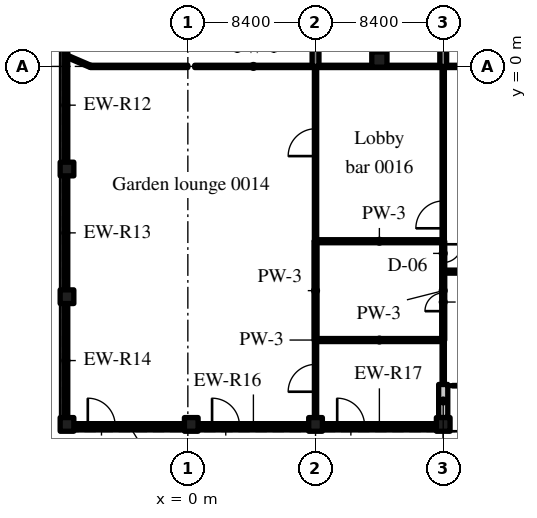
"""IFC4 building model, lengths in metres.
Left out: names, types, materials, properties, quantities, classifications, styles, units other than length and angle.
Written with IfcOpenShell. Run it as: python <this file> out.ifc"""

import sys

from ifc_helpers import new_model, si_unit, direction, frame, frame_2d, origin, origin_2d, place, context, subcontext, project, spatial, rectangle, extrude, source, transform, mapped, element, fill, save


model = new_model("IFC4")
c1 = context("Model", 3, precision=1e-05, world=origin(), true_north=direction((0.0, 1.0)))
c2 = subcontext(c1, "Body", "Model", "MODEL_VIEW")
j1 = project(units=[si_unit("LENGTHUNIT", "METRE"), si_unit("PLANEANGLEUNIT", "RADIAN")], contexts=[c1])
p1 = place(None, origin())
s1 = spatial("IfcSite", under=j1, at=p1, CompositionType="ELEMENT")
p2 = place(p1, origin())
s2 = spatial("IfcBuilding", under=s1, at=p2, CompositionType="ELEMENT")
p3 = place(p2, origin())
s3 = spatial("IfcBuildingStorey", under=s2, at=p3, CompositionType="ELEMENT", Elevation=0.0)
m1 = source(origin(), c2, "Body", "SweptSolid", [
    extrude(rectangle(XDim=19.6, YDim=0.45, at=frame_2d((9.8, 0.0))), origin(), (0.0, 0.0, 1.0), 5.72),
])
for number, where, z_axis, x_axis in (
    (1, (8.4, 0.0, 0.0), (0.0, 0.0, 1.0), (0.0, 1.0, 0.0)),
    (2, (16.8, 0.0, 0.0), (0.0, 0.0, 1.0), (0.0, 1.0, 0.0)),
):
    element("IfcWall", number, at=place(p3, frame(where, z_axis=z_axis, x_axis=x_axis)), inside=s3, PredefinedType="SHEAR", context=c2, shape_type="MappedRepresentation", body=[
        mapped(m1, transform((0.0, 0.0, 0.0), scale=1.0)),
    ])
m2 = source(origin(), c2, "Body", "SweptSolid", [
    extrude(rectangle(XDim=1.0, YDim=1.0, at=origin_2d()), origin(), (0.0, 0.0, 1.0), 5.72),
])
p4 = place(p3, frame((12.6, 0.45, 0.0), z_axis=(0.0, 0.0, 1.0), x_axis=(1.0, 0.0, 0.0)))
e3 = element("IfcColumn", 3, at=p4, inside=s3, PredefinedType="COLUMN", context=c2, shape_type="MappedRepresentation", body=[
    mapped(m2, transform((0.0, 0.0, 0.0), scale=1.0)),
])
m3 = source(origin(), c2, "Body", "SweptSolid", [
    extrude(rectangle(XDim=0.9, YDim=0.9, at=origin_2d()), origin(), (0.0, 0.0, 1.0), 5.72),
])
for number, where, z_axis, x_axis in (
    (4, (-7.95, -23.55, 0.0), (0.0, 0.0, 1.0), (1.0, 0.0, 0.0)),
    (5, (-7.95, -15.15, 0.0), (0.0, 0.0, 1.0), (1.0, 0.0, 0.0)),
    (6, (-7.95, -6.75, 0.0), (0.0, 0.0, 1.0), (1.0, 0.0, 0.0)),
    (7, (0.225, -23.55, 0.0), (0.0, 0.0, 1.0), (1.0, 0.0, 0.0)),
    (8, (8.4, -23.55, 0.0), (0.0, 0.0, 1.0), (1.0, 0.0, 0.0)),
    (9, (16.8, -23.55, 0.0), (0.0, 0.0, 1.0), (1.0, 0.0, 0.0)),
):
    element("IfcColumn", number, at=place(p3, frame(where, z_axis=z_axis, x_axis=x_axis)), inside=s3, PredefinedType="COLUMN", context=c2, shape_type="MappedRepresentation", body=[
        mapped(m3, transform((0.0, 0.0, 0.0), scale=1.0)),
    ])
m4 = source(origin(), c2, "Body", "SweptSolid", [
    extrude(rectangle(XDim=7.5, YDim=0.25, at=frame_2d((3.75, 0.0))), origin(), (0.0, 0.0, 1.0), 4.72),
])
p5 = place(p3, frame((-8.025, 1.2, 0.0), z_axis=(0.0, 0.0, 1.0), x_axis=(0.0, -1.0, 0.0)))
e10 = element("IfcWall", 10, at=p5, inside=s3, PredefinedType="SOLIDWALL", context=c2, shape_type="MappedRepresentation", body=[
    mapped(m4, transform((0.0, 0.0, 0.0), scale=1.0)),
])
m5 = source(origin(), c2, "Body", "SweptSolid", [
    extrude(rectangle(XDim=2.4, YDim=3.0, at=frame_2d((1.2, 1.5))), frame((0.0, 0.135, 0.0), z_axis=(0.0, -1.0, 0.0), x_axis=(1.0, 0.0, 0.0)), (0.0, 0.0, 1.0), 0.27),
])
p6 = place(p5, frame((0.675, 0.0, 0.2)))
e11 = element("IfcOpeningElement", 11, at=p6, cuts=e10, PredefinedType="OPENING", context=c2, shape_type="MappedRepresentation", body=[
    mapped(m5, transform((0.0, 0.0, 0.0), scale=1.0)),
])
p7 = place(p5, frame((4.425, 0.0, 0.2)))
e12 = element("IfcOpeningElement", 12, at=p7, cuts=e10, PredefinedType="OPENING", context=c2, shape_type="MappedRepresentation", body=[
    mapped(m5, transform((0.0, 0.0, 0.0), scale=1.0)),
])
p8 = place(p3, frame((-8.025, -7.2, 0.0), z_axis=(0.0, 0.0, 1.0), x_axis=(0.0, -1.0, 0.0)))
e13 = element("IfcWall", 13, at=p8, inside=s3, PredefinedType="SOLIDWALL", context=c2, shape_type="MappedRepresentation", body=[
    mapped(m4, transform((0.0, 0.0, 0.0), scale=1.0)),
])
p9 = place(p8, frame((0.675, 0.0, 0.2)))
e14 = element("IfcOpeningElement", 14, at=p9, cuts=e13, PredefinedType="OPENING", context=c2, shape_type="MappedRepresentation", body=[
    mapped(m5, transform((0.0, 0.0, 0.0), scale=1.0)),
])
p10 = place(p8, frame((4.425, 0.0, 0.2)))
e15 = element("IfcOpeningElement", 15, at=p10, cuts=e13, PredefinedType="OPENING", context=c2, shape_type="MappedRepresentation", body=[
    mapped(m5, transform((0.0, 0.0, 0.0), scale=1.0)),
])
p11 = place(p3, frame((-8.025, -15.6, 0.0), z_axis=(0.0, 0.0, 1.0), x_axis=(0.0, -1.0, 0.0)))
e16 = element("IfcWall", 16, at=p11, inside=s3, PredefinedType="SOLIDWALL", context=c2, shape_type="MappedRepresentation", body=[
    mapped(m4, transform((0.0, 0.0, 0.0), scale=1.0)),
])
p12 = place(p11, frame((0.675, 0.0, 0.2)))
e17 = element("IfcOpeningElement", 17, at=p12, cuts=e16, PredefinedType="OPENING", context=c2, shape_type="MappedRepresentation", body=[
    mapped(m5, transform((0.0, 0.0, 0.0), scale=1.0)),
])
p13 = place(p11, frame((4.425, 0.0, 0.2)))
e18 = element("IfcOpeningElement", 18, at=p13, cuts=e16, PredefinedType="OPENING", context=c2, shape_type="MappedRepresentation", body=[
    mapped(m5, transform((0.0, 0.0, 0.0), scale=1.0)),
])
m6 = source(origin(), c2, "Body", "SweptSolid", [
    extrude(rectangle(XDim=7.275, YDim=0.25, at=frame_2d((3.637, 0.0))), origin(), (0.0, 0.0, 1.0), 4.65),
])
p14 = place(p3, frame((-7.5, -23.625, 0.0), z_axis=(0.0, 0.0, 1.0), x_axis=(1.0, 0.0, 0.0)))
e19 = element("IfcWall", 19, at=p14, inside=s3, PredefinedType="SOLIDWALL", context=c2, shape_type="MappedRepresentation", body=[
    mapped(m6, transform((0.0, 0.0, 0.0), scale=1.0)),
])
m7 = source(origin(), c2, "Body", "SweptSolid", [
    extrude(rectangle(XDim=1.8, YDim=2.4, at=frame_2d((0.9, 1.2))), frame((0.0, 0.135, 0.0), z_axis=(0.0, -1.0, 0.0), x_axis=(1.0, 0.0, 0.0)), (0.0, 0.0, 1.0), 0.27),
])
p15 = place(p14, frame((0.919, 0.0, 0.0)))
e20 = element("IfcOpeningElement", 20, at=p15, cuts=e19, PredefinedType="OPENING", context=c2, shape_type="MappedRepresentation", body=[
    mapped(m7, transform((0.0, 0.0, 0.0), scale=1.0)),
])
p16 = place(p14, frame((4.256, 0.0, 0.2)))
e21 = element("IfcOpeningElement", 21, at=p16, cuts=e19, PredefinedType="OPENING", context=c2, shape_type="MappedRepresentation", body=[
    mapped(m5, transform((0.0, 0.0, 0.0), scale=1.0)),
])
p17 = place(p3, frame((0.675, -23.625, 0.0), z_axis=(0.0, 0.0, 1.0), x_axis=(1.0, 0.0, 0.0)))
e22 = element("IfcWall", 22, at=p17, inside=s3, PredefinedType="SOLIDWALL", context=c2, shape_type="MappedRepresentation", body=[
    mapped(m6, transform((0.0, 0.0, 0.0), scale=1.0)),
])
p18 = place(p17, frame((0.919, 0.0, 0.0)))
e23 = element("IfcOpeningElement", 23, at=p18, cuts=e22, PredefinedType="OPENING", context=c2, shape_type="MappedRepresentation", body=[
    mapped(m7, transform((0.0, 0.0, 0.0), scale=1.0)),
])
p19 = place(p17, frame((4.256, 0.0, 0.2)))
e24 = element("IfcOpeningElement", 24, at=p19, cuts=e22, PredefinedType="OPENING", context=c2, shape_type="MappedRepresentation", body=[
    mapped(m5, transform((0.0, 0.0, 0.0), scale=1.0)),
])
m8 = source(origin(), c2, "Body", "SweptSolid", [
    extrude(rectangle(XDim=7.5, YDim=0.25, at=frame_2d((3.75, 0.0))), origin(), (0.0, 0.0, 1.0), 4.65),
])
p20 = place(p3, frame((8.85, -23.625, 0.0), z_axis=(0.0, 0.0, 1.0), x_axis=(1.0, 0.0, 0.0)))
e25 = element("IfcWall", 25, at=p20, inside=s3, PredefinedType="SOLIDWALL", context=c2, shape_type="MappedRepresentation", body=[
    mapped(m8, transform((0.0, 0.0, 0.0), scale=1.0)),
])
p21 = place(p20, frame((0.975, 0.0, 0.0)))
e26 = element("IfcOpeningElement", 26, at=p21, cuts=e25, PredefinedType="OPENING", context=c2, shape_type="MappedRepresentation", body=[
    mapped(m7, transform((0.0, 0.0, 0.0), scale=1.0)),
])
p22 = place(p20, frame((4.425, 0.0, 0.2)))
e27 = element("IfcOpeningElement", 27, at=p22, cuts=e25, PredefinedType="OPENING", context=c2, shape_type="MappedRepresentation", body=[
    mapped(m5, transform((0.0, 0.0, 0.0), scale=1.0)),
])
m9 = source(origin(), c2, "Body", "SweptSolid", [
    extrude(rectangle(XDim=2.18, YDim=0.6, at=frame_2d((1.09, 0.0))), origin(), (0.0, 0.0, 1.0), 4.05),
])
p23 = place(p3, frame((16.8, -23.1, 0.0), z_axis=(0.0, 0.0, 1.0), x_axis=(0.0, 1.0, 0.0)))
e28 = element("IfcWall", 28, at=p23, inside=s3, PredefinedType="SOLIDWALL", context=c2, shape_type="MappedRepresentation", body=[
    mapped(m9, transform((0.0, 0.0, 0.0), scale=1.0)),
])
m10 = source(origin(), c2, "Body", "SweptSolid", [
    extrude(rectangle(XDim=7.725, YDim=0.15, at=frame_2d((3.863, 0.0))), origin(), (0.0, 0.0, 1.0), 5.72),
])
p24 = place(p3, frame((0.45, 0.0, 0.0), z_axis=(0.0, 0.0, 1.0), x_axis=(1.0, 0.0, 0.0)))
e29 = element("IfcWall", 29, at=p24, inside=s3, PredefinedType="PARTITIONING", context=c2, shape_type="MappedRepresentation", body=[
    mapped(m10, transform((0.0, 0.0, 0.0), scale=1.0)),
])
m11 = source(origin(), c2, "Body", "SweptSolid", [
    extrude(rectangle(XDim=7.95, YDim=0.15, at=frame_2d((3.975, 0.0))), origin(), (0.0, 0.0, 1.0), 5.72),
])
p25 = place(p3, frame((8.625, 0.0, 0.0), z_axis=(0.0, 0.0, 1.0), x_axis=(1.0, 0.0, 0.0)))
e30 = element("IfcWall", 30, at=p25, inside=s3, PredefinedType="PARTITIONING", context=c2, shape_type="MappedRepresentation", body=[
    mapped(m11, transform((0.0, 0.0, 0.0), scale=1.0)),
])
m12 = source(origin(), c2, "Body", "SweptSolid", [
    extrude(rectangle(XDim=7.95, YDim=0.15, at=frame_2d((3.975, 0.0))), origin(), (0.0, 0.0, 1.0), 5.72),
])
p26 = place(p3, frame((17.025, 0.0, 0.0), z_axis=(0.0, 0.0, 1.0), x_axis=(1.0, 0.0, 0.0)))
e31 = element("IfcWall", 31, at=p26, inside=s3, PredefinedType="PARTITIONING", context=c2, shape_type="MappedRepresentation", body=[
    mapped(m12, transform((0.0, 0.0, 0.0), scale=1.0)),
])
m13 = source(origin(), c2, "Body", "SweptSolid", [
    extrude(rectangle(XDim=5.5, YDim=0.15, at=frame_2d((2.75, 0.0))), origin(), (0.0, 0.0, 1.0), 4.12),
])
p27 = place(p3, frame((8.4, -23.5, 0.0), z_axis=(0.0, 0.0, 1.0), x_axis=(0.0, 1.0, 0.0)))
e32 = element("IfcWall", 32, at=p27, inside=s3, PredefinedType="PARTITIONING", context=c2, shape_type="MappedRepresentation", body=[
    mapped(m13, transform((0.0, 0.0, 0.0), scale=1.0)),
])
m14 = source(origin(), c2, "Body", "SweptSolid", [
    extrude(rectangle(XDim=1.8, YDim=2.1, at=frame_2d((0.9, 1.05))), frame((0.0, 0.085, 0.0), z_axis=(0.0, -1.0, 0.0), x_axis=(1.0, 0.0, 0.0)), (0.0, 0.0, 1.0), 0.17),
])
p28 = place(p27, frame((2.1, 0.0, 0.0)))
e33 = element("IfcOpeningElement", 33, at=p28, cuts=e32, PredefinedType="OPENING", context=c2, shape_type="MappedRepresentation", body=[
    mapped(m14, transform((0.0, 0.0, 0.0), scale=1.0)),
])
m15 = source(origin(), c2, "Body", "SweptSolid", [
    extrude(rectangle(XDim=6.5, YDim=0.2, at=frame_2d((3.25, 0.0))), origin(), (0.0, 0.0, 1.0), 4.12),
])
p29 = place(p3, frame((8.4, -18.0, 0.0), z_axis=(0.0, 0.0, 1.0), x_axis=(0.0, 1.0, 0.0)))
e34 = element("IfcWall", 34, at=p29, inside=s3, PredefinedType="PARTITIONING", context=c2, shape_type="MappedRepresentation", body=[
    mapped(m15, transform((0.0, 0.0, 0.0), scale=1.0)),
])
m16 = source(origin(), c2, "Body", "SweptSolid", [
    extrude(rectangle(XDim=11.425, YDim=0.15, at=frame_2d((5.712, 0.0))), origin(), (0.0, 0.0, 1.0), 4.12),
])
p30 = place(p3, frame((8.4, -11.5, 0.0), z_axis=(0.0, 0.0, 1.0), x_axis=(0.0, 1.0, 0.0)))
e35 = element("IfcWall", 35, at=p30, inside=s3, PredefinedType="PARTITIONING", context=c2, shape_type="MappedRepresentation", body=[
    mapped(m16, transform((0.0, 0.0, 0.0), scale=1.0)),
])
p31 = place(p30, frame((5.6, 0.0, 0.0)))
e36 = element("IfcOpeningElement", 36, at=p31, cuts=e35, PredefinedType="OPENING", context=c2, shape_type="MappedRepresentation", body=[
    mapped(m14, transform((0.0, 0.0, 0.0), scale=1.0)),
])
m17 = source(origin(), c2, "Body", "SweptSolid", [
    extrude(rectangle(XDim=2.92, YDim=0.15, at=frame_2d((1.46, 0.0))), origin(), (0.0, 0.0, 1.0), 4.12),
])
p32 = place(p3, frame((16.8, -20.92, 0.0), z_axis=(0.0, 0.0, 1.0), x_axis=(0.0, 1.0, 0.0)))
e37 = element("IfcWall", 37, at=p32, inside=s3, PredefinedType="PARTITIONING", context=c2, shape_type="MappedRepresentation", body=[
    mapped(m17, transform((0.0, 0.0, 0.0), scale=1.0)),
])
p33 = place(p3, frame((16.8, -18.0, 0.0), z_axis=(0.0, 0.0, 1.0), x_axis=(0.0, 1.0, 0.0)))
e38 = element("IfcWall", 38, at=p33, inside=s3, PredefinedType="PARTITIONING", context=c2, shape_type="MappedRepresentation", body=[
    mapped(m15, transform((0.0, 0.0, 0.0), scale=1.0)),
])
m18 = source(origin(), c2, "Body", "SweptSolid", [
    extrude(rectangle(XDim=1.2, YDim=2.1, at=frame_2d((0.6, 1.05))), frame((0.0, 0.11, 0.0), z_axis=(0.0, -1.0, 0.0), x_axis=(1.0, 0.0, 0.0)), (0.0, 0.0, 1.0), 0.22),
])
p34 = place(p33, frame((1.9, 0.0, 0.0)))
e39 = element("IfcOpeningElement", 39, at=p34, cuts=e38, PredefinedType="OPENING", context=c2, shape_type="MappedRepresentation", body=[
    mapped(m18, transform((0.0, 0.0, 0.0), scale=1.0)),
])
p35 = place(p33, frame((5.1, 0.0, 0.0)))
e40 = element("IfcOpeningElement", 40, at=p35, cuts=e38, PredefinedType="OPENING", context=c2, shape_type="MappedRepresentation", body=[
    mapped(m18, transform((0.0, 0.0, 0.0), scale=1.0)),
])
m19 = source(origin(), c2, "Body", "SweptSolid", [
    extrude(rectangle(XDim=8.4, YDim=0.2, at=frame_2d((4.2, 0.0))), origin(), (0.0, 0.0, 1.0), 5.72),
])
for number, where, z_axis, x_axis in (
    (41, (8.4, -18.0, 0.0), (0.0, 0.0, 1.0), (1.0, 0.0, 0.0)),
    (42, (8.4, -11.5, 0.0), (0.0, 0.0, 1.0), (1.0, 0.0, 0.0)),
):
    element("IfcWall", number, at=place(p3, frame(where, z_axis=z_axis, x_axis=x_axis)), inside=s3, PredefinedType="PARTITIONING", context=c2, shape_type="MappedRepresentation", body=[
        mapped(m19, transform((0.0, 0.0, 0.0), scale=1.0)),
    ])
p36 = place(p3, frame((16.8, -11.5, 0.0), z_axis=(0.0, 0.0, 1.0), x_axis=(0.0, 1.0, 0.0)))
e43 = element("IfcWall", 43, at=p36, inside=s3, PredefinedType="PARTITIONING", context=c2, shape_type="MappedRepresentation", body=[
    mapped(m16, transform((0.0, 0.0, 0.0), scale=1.0)),
])
p37 = place(p36, frame((0.85, 0.0, 0.0)))
e44 = element("IfcOpeningElement", 44, at=p37, cuts=e43, PredefinedType="OPENING", context=c2, shape_type="MappedRepresentation", body=[
    mapped(m14, transform((0.0, 0.0, 0.0), scale=1.0)),
])
m20 = source(origin(), c2, "Body", "SweptSolid", [
    extrude(rectangle(XDim=25.2, YDim=0.2, at=frame_2d((12.6, 0.0))), origin(), (0.0, 0.0, 1.0), 5.72),
])
p38 = place(p3, frame((16.8, -13.5, 0.0), z_axis=(0.0, 0.0, 1.0), x_axis=(1.0, 0.0, 0.0)))
e45 = element("IfcWall", 45, at=p38, inside=s3, PredefinedType="PARTITIONING", context=c2, shape_type="MappedRepresentation", body=[
    mapped(m20, transform((0.0, 0.0, 0.0), scale=1.0)),
])
m21 = source(origin(), c2, "Body", "SweptSolid", [
    extrude(rectangle(XDim=2.4, YDim=2.1, at=frame_2d((1.2, 1.05))), frame((0.0, 0.11, 0.0), z_axis=(0.0, -1.0, 0.0), x_axis=(1.0, 0.0, 0.0)), (0.0, 0.0, 1.0), 0.22),
])
p39 = place(p38, frame((1.2, 0.0, 0.0)))
e46 = element("IfcOpeningElement", 46, at=p39, cuts=e45, PredefinedType="OPENING", context=c2, shape_type="MappedRepresentation", body=[
    mapped(m21, transform((0.0, 0.0, 0.0), scale=1.0)),
])
p40 = place(p38, frame((6.2, 0.0, 0.0)))
e47 = element("IfcOpeningElement", 47, at=p40, cuts=e45, PredefinedType="OPENING", context=c2, shape_type="MappedRepresentation", body=[
    mapped(m21, transform((0.0, 0.0, 0.0), scale=1.0)),
])
p41 = place(p38, frame((11.2, 0.0, 0.0)))
e48 = element("IfcOpeningElement", 48, at=p41, cuts=e45, PredefinedType="OPENING", context=c2, shape_type="MappedRepresentation", body=[
    mapped(m21, transform((0.0, 0.0, 0.0), scale=1.0)),
])
p42 = place(p38, frame((16.2, 0.0, 0.0)))
e49 = element("IfcOpeningElement", 49, at=p42, cuts=e45, PredefinedType="OPENING", context=c2, shape_type="MappedRepresentation", body=[
    mapped(m21, transform((0.0, 0.0, 0.0), scale=1.0)),
])
p43 = place(p38, frame((21.2, 0.0, 0.0)))
e50 = element("IfcOpeningElement", 50, at=p43, cuts=e45, PredefinedType="OPENING", context=c2, shape_type="MappedRepresentation", body=[
    mapped(m21, transform((0.0, 0.0, 0.0), scale=1.0)),
])
m22 = source(origin(), c2, "Body", "SweptSolid", [
    extrude(rectangle(XDim=6.4, YDim=0.15, at=frame_2d((3.2, 0.0))), origin(), (0.0, 0.0, 1.0), 5.72),
])
p44 = place(p3, frame((-6.4, 0.0, 0.0), z_axis=(0.0, 0.0, 1.0), x_axis=(1.0, 0.0, 0.0)))
e51 = element("IfcWall", 51, at=p44, inside=s3, PredefinedType="PARTITIONING", context=c2, shape_type="MappedRepresentation", body=[
    mapped(m22, transform((0.0, 0.0, 0.0), scale=1.0)),
])
m23 = source(origin(), c2, "Body", "SweptSolid", [
    extrude(rectangle(XDim=1.633, YDim=0.15, at=frame_2d((0.816, 0.0))), origin(), (0.0, 0.0, 1.0), 5.72),
])
p45 = place(p3, frame((-7.9, 0.645, 0.0), z_axis=(0.0, 0.0, 1.0), x_axis=(0.918664846596, -0.395037845818, 0.0)))
e52 = element("IfcWall", 52, at=p45, inside=s3, PredefinedType="PARTITIONING", context=c2, shape_type="MappedRepresentation", body=[
    mapped(m23, transform((0.0, 0.0, 0.0), scale=1.0)),
])
m24 = source(origin(), c2, "Body", "SweptSolid", [
    extrude(rectangle(XDim=2.4, YDim=3.0, at=frame_2d((1.2, 1.5))), frame((0.0, 0.03, 0.0), z_axis=(0.0, -1.0, 0.0), x_axis=(1.0, 0.0, 0.0)), (0.0, 0.0, 1.0), 0.06),
])
p46 = place(p6, origin())
e53 = element("IfcWindow", 53, at=p46, inside=s3, PartitioningType="SINGLE_PANEL", PredefinedType="WINDOW", context=c2, shape_type="MappedRepresentation", body=[
    mapped(m24, transform((0.0, 0.0, 0.0), scale=1.0)),
])
fill(e11, e53)
p47 = place(p7, origin())
e54 = element("IfcWindow", 54, at=p47, inside=s3, PartitioningType="SINGLE_PANEL", PredefinedType="WINDOW", context=c2, shape_type="MappedRepresentation", body=[
    mapped(m24, transform((0.0, 0.0, 0.0), scale=1.0)),
])
fill(e12, e54)
p48 = place(p9, origin())
e55 = element("IfcWindow", 55, at=p48, inside=s3, PartitioningType="SINGLE_PANEL", PredefinedType="WINDOW", context=c2, shape_type="MappedRepresentation", body=[
    mapped(m24, transform((0.0, 0.0, 0.0), scale=1.0)),
])
fill(e14, e55)
p49 = place(p10, origin())
e56 = element("IfcWindow", 56, at=p49, inside=s3, PartitioningType="SINGLE_PANEL", PredefinedType="WINDOW", context=c2, shape_type="MappedRepresentation", body=[
    mapped(m24, transform((0.0, 0.0, 0.0), scale=1.0)),
])
fill(e15, e56)
p50 = place(p12, origin())
e57 = element("IfcWindow", 57, at=p50, inside=s3, PartitioningType="SINGLE_PANEL", PredefinedType="WINDOW", context=c2, shape_type="MappedRepresentation", body=[
    mapped(m24, transform((0.0, 0.0, 0.0), scale=1.0)),
])
fill(e17, e57)
p51 = place(p13, origin())
e58 = element("IfcWindow", 58, at=p51, inside=s3, PartitioningType="SINGLE_PANEL", PredefinedType="WINDOW", context=c2, shape_type="MappedRepresentation", body=[
    mapped(m24, transform((0.0, 0.0, 0.0), scale=1.0)),
])
fill(e18, e58)
m25 = source(origin(), c2, "Body", "SweptSolid", [
    extrude(rectangle(XDim=1.8, YDim=2.4, at=frame_2d((0.9, 1.2))), frame((0.0, 0.025, 0.0), z_axis=(0.0, -1.0, 0.0), x_axis=(1.0, 0.0, 0.0)), (0.0, 0.0, 1.0), 0.05),
])
p52 = place(p15, origin())
e59 = element("IfcDoor", 59, at=p52, inside=s3, OperationType="DOUBLE_DOOR_SINGLE_SWING", PredefinedType="DOOR", context=c2, shape_type="MappedRepresentation", body=[
    mapped(m25, transform((0.0, 0.0, 0.0), scale=1.0)),
])
fill(e20, e59)
p53 = place(p16, origin())
e60 = element("IfcWindow", 60, at=p53, inside=s3, PartitioningType="SINGLE_PANEL", PredefinedType="WINDOW", context=c2, shape_type="MappedRepresentation", body=[
    mapped(m24, transform((0.0, 0.0, 0.0), scale=1.0)),
])
fill(e21, e60)
p54 = place(p18, origin())
e61 = element("IfcDoor", 61, at=p54, inside=s3, OperationType="DOUBLE_DOOR_SINGLE_SWING", PredefinedType="DOOR", context=c2, shape_type="MappedRepresentation", body=[
    mapped(m25, transform((0.0, 0.0, 0.0), scale=1.0)),
])
fill(e23, e61)
p55 = place(p19, origin())
e62 = element("IfcWindow", 62, at=p55, inside=s3, PartitioningType="SINGLE_PANEL", PredefinedType="WINDOW", context=c2, shape_type="MappedRepresentation", body=[
    mapped(m24, transform((0.0, 0.0, 0.0), scale=1.0)),
])
fill(e24, e62)
p56 = place(p21, origin())
e63 = element("IfcDoor", 63, at=p56, inside=s3, OperationType="DOUBLE_DOOR_SINGLE_SWING", PredefinedType="DOOR", context=c2, shape_type="MappedRepresentation", body=[
    mapped(m25, transform((0.0, 0.0, 0.0), scale=1.0)),
])
fill(e26, e63)
p57 = place(p22, origin())
e64 = element("IfcWindow", 64, at=p57, inside=s3, PartitioningType="SINGLE_PANEL", PredefinedType="WINDOW", context=c2, shape_type="MappedRepresentation", body=[
    mapped(m24, transform((0.0, 0.0, 0.0), scale=1.0)),
])
fill(e27, e64)
m26 = source(origin(), c2, "Body", "SweptSolid", [
    extrude(rectangle(XDim=1.8, YDim=2.1, at=frame_2d((0.9, 1.05))), frame((0.0, 0.025, 0.0), z_axis=(0.0, -1.0, 0.0), x_axis=(1.0, 0.0, 0.0)), (0.0, 0.0, 1.0), 0.05),
])
p58 = place(p28, origin())
e65 = element("IfcDoor", 65, at=p58, inside=s3, OperationType="DOUBLE_DOOR_SINGLE_SWING", PredefinedType="DOOR", context=c2, shape_type="MappedRepresentation", body=[
    mapped(m26, transform((0.0, 0.0, 0.0), scale=1.0)),
])
fill(e33, e65)
p59 = place(p31, origin())
e66 = element("IfcDoor", 66, at=p59, inside=s3, OperationType="DOUBLE_DOOR_SINGLE_SWING", PredefinedType="DOOR", context=c2, shape_type="MappedRepresentation", body=[
    mapped(m26, transform((0.0, 0.0, 0.0), scale=1.0)),
])
fill(e36, e66)
m27 = source(origin(), c2, "Body", "SweptSolid", [
    extrude(rectangle(XDim=1.2, YDim=2.1, at=frame_2d((0.6, 1.05))), frame((0.0, 0.025, 0.0), z_axis=(0.0, -1.0, 0.0), x_axis=(1.0, 0.0, 0.0)), (0.0, 0.0, 1.0), 0.05),
])
p60 = place(p34, origin())
e67 = element("IfcDoor", 67, at=p60, inside=s3, OperationType="SINGLE_SWING_LEFT", PredefinedType="DOOR", context=c2, shape_type="MappedRepresentation", body=[
    mapped(m27, transform((0.0, 0.0, 0.0), scale=1.0)),
])
fill(e39, e67)
p61 = place(p35, origin())
e68 = element("IfcDoor", 68, at=p61, inside=s3, OperationType="SINGLE_SWING_RIGHT", PredefinedType="DOOR", context=c2, shape_type="MappedRepresentation", body=[
    mapped(m27, transform((0.0, 0.0, 0.0), scale=1.0)),
])
fill(e40, e68)
p62 = place(p37, origin())
e69 = element("IfcDoor", 69, at=p62, inside=s3, OperationType="DOUBLE_DOOR_SINGLE_SWING", PredefinedType="DOOR", context=c2, shape_type="MappedRepresentation", body=[
    mapped(m26, transform((0.0, 0.0, 0.0), scale=1.0)),
])
fill(e44, e69)
save(model, sys.argv[1])
